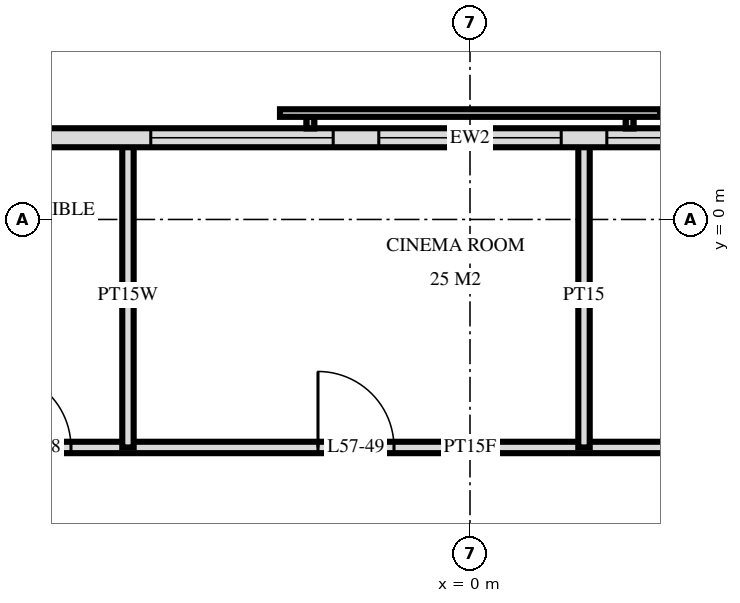
"""IFC4 building model, lengths in metres.
Left out: names, types, materials, properties, quantities, classifications, styles, units other than length and angle.
Written with IfcOpenShell. Run it as: python <this file> out.ifc"""

import sys

from ifc_helpers import new_model, si_unit, direction, frame, frame_2d, origin, place, context, subcontext, project, spatial, rectangle, extrude, element, fill, save


model = new_model("IFC4")
c1 = context("Model", 3, precision=1e-05, world=origin(), true_north=direction((0.0, 1.0)))
c2 = subcontext(c1, "Body", "Model", "MODEL_VIEW")
j1 = project(units=[si_unit("LENGTHUNIT", "METRE"), si_unit("PLANEANGLEUNIT", "RADIAN")], contexts=[c1])
p1 = place(None, origin())
s1 = spatial("IfcSite", under=j1, at=p1, CompositionType="ELEMENT")
p2 = place(p1, origin())
s2 = spatial("IfcBuilding", under=s1, at=p2, CompositionType="ELEMENT")
p3 = place(p2, frame((0.0, 0.0, 218.6)))
s3 = spatial("IfcBuildingStorey", under=s2, at=p3, CompositionType="ELEMENT", Elevation=218.6)
p4 = place(p3, frame((22.475, 1.075, 0.0), z_axis=(0.0, 0.0, 1.0), x_axis=(-1.0, 0.0, 0.0)))
e1 = element("IfcWall", 1, at=p4, inside=s3, PredefinedType="SOLIDWALL", context=c2, shape_type="SweptSolid", body=[
    extrude(rectangle(XDim=44.951, YDim=0.25, at=frame_2d((22.475, 0.0))), origin(), (0.0, 0.0, 1.0), 3.22),
])
p5 = place(p4, frame((15.275, 0.0, 0.9)))
e2 = element("IfcOpeningElement", 2, at=p5, cuts=e1, PredefinedType="OPENING", context=c2, shape_type="SweptSolid", body=[
    extrude(rectangle(XDim=2.4, YDim=1.5, at=frame_2d((1.2, 0.75))), frame((0.0, 0.135, 0.0), z_axis=(0.0, -1.0, 0.0), x_axis=(1.0, 0.0, 0.0)), (0.0, 0.0, 1.0), 0.27),
])
p6 = place(p4, frame((18.275, 0.0, 0.9)))
e3 = element("IfcOpeningElement", 3, at=p6, cuts=e1, PredefinedType="OPENING", context=c2, shape_type="SweptSolid", body=[
    extrude(rectangle(XDim=2.4, YDim=1.5, at=frame_2d((1.2, 0.75))), frame((0.0, 0.135, 0.0), z_axis=(0.0, -1.0, 0.0), x_axis=(1.0, 0.0, 0.0)), (0.0, 0.0, 1.0), 0.27),
])
p7 = place(p4, frame((21.275, 0.0, 0.9)))
e4 = element("IfcOpeningElement", 4, at=p7, cuts=e1, PredefinedType="OPENING", context=c2, shape_type="SweptSolid", body=[
    extrude(rectangle(XDim=2.4, YDim=1.5, at=frame_2d((1.2, 0.75))), frame((0.0, 0.135, 0.0), z_axis=(0.0, -1.0, 0.0), x_axis=(1.0, 0.0, 0.0)), (0.0, 0.0, 1.0), 0.27),
])
p8 = place(p4, frame((24.275, 0.0, 0.9)))
e5 = element("IfcOpeningElement", 5, at=p8, cuts=e1, PredefinedType="OPENING", context=c2, shape_type="SweptSolid", body=[
    extrude(rectangle(XDim=2.4, YDim=1.5, at=frame_2d((1.2, 0.75))), frame((0.0, 0.135, 0.0), z_axis=(0.0, -1.0, 0.0), x_axis=(1.0, 0.0, 0.0)), (0.0, 0.0, 1.0), 0.27),
])
p9 = place(p3, frame((1.5, -3.0, 0.0), z_axis=(0.0, 0.0, 1.0), x_axis=(0.0, 1.0, 0.0)))
e6 = element("IfcWall", 6, at=p9, inside=s3, PredefinedType="PARTITIONING", context=c2, shape_type="SweptSolid", body=[
    extrude(rectangle(XDim=4.02, YDim=0.15, at=frame_2d((2.01, 0.0))), origin(), (0.0, 0.0, 1.0), 3.22),
])
p10 = place(p3, frame((-4.5, -3.0, 0.0), z_axis=(0.0, 0.0, 1.0), x_axis=(0.0, 1.0, 0.0)))
e7 = element("IfcWall", 7, at=p10, inside=s3, PredefinedType="PLUMBINGWALL", context=c2, shape_type="SweptSolid", body=[
    extrude(rectangle(XDim=4.02, YDim=0.15, at=frame_2d((2.01, 0.0))), origin(), (0.0, 0.0, 1.0), 3.22),
])
p11 = place(p3, frame((-9.95, -3.0, 0.0), z_axis=(0.0, 0.0, 1.0), x_axis=(1.0, 0.0, 0.0)))
e8 = element("IfcWall", 8, at=p11, inside=s3, PredefinedType="PARTITIONING", context=c2, shape_type="SweptSolid", body=[
    extrude(rectangle(XDim=19.9, YDim=0.15, at=frame_2d((9.95, 0.0))), origin(), (0.0, 0.0, 1.0), 3.22),
])
p12 = place(p11, frame((0.95, 0.0, 0.0)))
e9 = element("IfcOpeningElement", 9, at=p12, cuts=e8, PredefinedType="OPENING", context=c2, shape_type="SweptSolid", body=[
    extrude(rectangle(XDim=1.0, YDim=2.1, at=frame_2d((0.5, 1.05))), frame((0.0, 0.085, 0.0), z_axis=(0.0, -1.0, 0.0), x_axis=(1.0, 0.0, 0.0)), (0.0, 0.0, 1.0), 0.17),
])
p13 = place(p11, frame((3.7, 0.0, 0.0)))
e10 = element("IfcOpeningElement", 10, at=p13, cuts=e8, PredefinedType="OPENING", context=c2, shape_type="SweptSolid", body=[
    extrude(rectangle(XDim=1.0, YDim=2.1, at=frame_2d((0.5, 1.05))), frame((0.0, 0.085, 0.0), z_axis=(0.0, -1.0, 0.0), x_axis=(1.0, 0.0, 0.0)), (0.0, 0.0, 1.0), 0.17),
])
p14 = place(p11, frame((7.95, 0.0, 0.0)))
e11 = element("IfcOpeningElement", 11, at=p14, cuts=e8, PredefinedType="OPENING", context=c2, shape_type="SweptSolid", body=[
    extrude(rectangle(XDim=1.0, YDim=2.1, at=frame_2d((0.5, 1.05))), frame((0.0, 0.085, 0.0), z_axis=(0.0, -1.0, 0.0), x_axis=(1.0, 0.0, 0.0)), (0.0, 0.0, 1.0), 0.17),
])
p15 = place(p11, frame((15.2, 0.0, 0.0)))
e12 = element("IfcOpeningElement", 12, at=p15, cuts=e8, PredefinedType="OPENING", context=c2, shape_type="SweptSolid", body=[
    extrude(rectangle(XDim=1.0, YDim=2.1, at=frame_2d((0.5, 1.05))), frame((0.0, 0.085, 0.0), z_axis=(0.0, -1.0, 0.0), x_axis=(1.0, 0.0, 0.0)), (0.0, 0.0, 1.0), 0.17),
])
p16 = place(p6, origin())
e13 = element("IfcWindow", 13, at=p16, inside=s3, PartitioningType="SINGLE_PANEL", PredefinedType="WINDOW", context=c2, shape_type="SweptSolid", body=[
    extrude(rectangle(XDim=2.4, YDim=1.5, at=frame_2d((1.2, 0.75))), frame((0.0, 0.03, 0.0), z_axis=(0.0, -1.0, 0.0), x_axis=(1.0, 0.0, 0.0)), (0.0, 0.0, 1.0), 0.06),
])
fill(e3, e13)
p17 = place(p7, origin())
e14 = element("IfcWindow", 14, at=p17, inside=s3, PartitioningType="SINGLE_PANEL", PredefinedType="WINDOW", context=c2, shape_type="SweptSolid", body=[
    extrude(rectangle(XDim=2.4, YDim=1.5, at=frame_2d((1.2, 0.75))), frame((0.0, 0.03, 0.0), z_axis=(0.0, -1.0, 0.0), x_axis=(1.0, 0.0, 0.0)), (0.0, 0.0, 1.0), 0.06),
])
fill(e4, e14)
p18 = place(p8, origin())
e15 = element("IfcWindow", 15, at=p18, inside=s3, PartitioningType="SINGLE_PANEL", PredefinedType="WINDOW", context=c2, shape_type="SweptSolid", body=[
    extrude(rectangle(XDim=2.4, YDim=1.5, at=frame_2d((1.2, 0.75))), frame((0.0, 0.03, 0.0), z_axis=(0.0, -1.0, 0.0), x_axis=(1.0, 0.0, 0.0)), (0.0, 0.0, 1.0), 0.06),
])
fill(e5, e15)
p19 = place(p13, origin())
e16 = element("IfcDoor", 16, at=p19, inside=s3, OperationType="SINGLE_SWING_RIGHT", PredefinedType="DOOR", context=c2, shape_type="SweptSolid", body=[
    extrude(rectangle(XDim=1.0, YDim=2.1, at=frame_2d((0.5, 1.05))), frame((0.0, 0.025, 0.0), z_axis=(0.0, -1.0, 0.0), x_axis=(1.0, 0.0, 0.0)), (0.0, 0.0, 1.0), 0.05),
])
fill(e10, e16)
p20 = place(p14, origin())
e17 = element("IfcDoor", 17, at=p20, inside=s3, OperationType="SINGLE_SWING_RIGHT", PredefinedType="DOOR", context=c2, shape_type="SweptSolid", body=[
    extrude(rectangle(XDim=1.0, YDim=2.1, at=frame_2d((0.5, 1.05))), frame((0.0, 0.025, 0.0), z_axis=(0.0, -1.0, 0.0), x_axis=(1.0, 0.0, 0.0)), (0.0, 0.0, 1.0), 0.05),
])
fill(e11, e17)
save(model, sys.argv[1])
